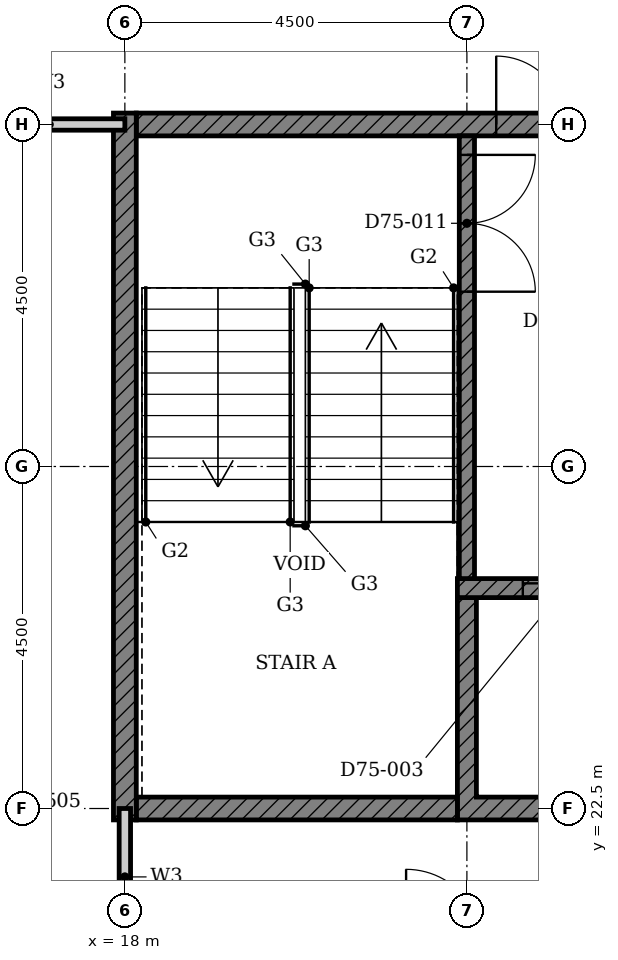
"""IFC4 building model, lengths in metres.
Left out: names, types, materials, properties, quantities, classifications, styles, units other than length and angle.
Written with IfcOpenShell. Run it as: python <this file> out.ifc"""

import sys

from ifc_helpers import new_model, si_unit, direction, frame, frame_2d, origin, place, context, subcontext, project, spatial, polyline, rectangle, outline, extrude, element, fill, save


model = new_model("IFC4")
c1 = context("Model", 3, precision=1e-05, world=origin(), true_north=direction((0.0, 1.0)))
c2 = subcontext(c1, "Body", "Model", "MODEL_VIEW")
j1 = project(units=[si_unit("LENGTHUNIT", "METRE"), si_unit("PLANEANGLEUNIT", "RADIAN")], contexts=[c1])
p1 = place(None, origin())
s1 = spatial("IfcSite", under=j1, at=p1, CompositionType="ELEMENT")
p2 = place(p1, origin())
s2 = spatial("IfcBuilding", under=s1, at=p2, CompositionType="ELEMENT")
p3 = place(p2, frame((0.0, 0.0, 294.5)))
s3 = spatial("IfcBuildingStorey", under=s2, at=p3, CompositionType="ELEMENT", Elevation=294.5)
p4 = place(p3, origin())
e1 = element("IfcWall", 1, at=p4, inside=s3, PredefinedType="SHEAR", context=c2, shape_type="SweptSolid", body=[
    extrude(outline(polyline([(22.375, 22.35), (25.197, 22.35), (25.197, 25.275), (24.947, 25.275), (24.947, 22.65), (22.625, 22.65), (22.625, 25.275), (22.375, 25.275), (22.375, 22.35)])), origin(), (0.0, 0.0, 1.0), 3.4),
])
p5 = place(p3, frame((18.15, 22.5, 0.0), z_axis=(0.0, 0.0, 1.0), x_axis=(1.0, 0.0, 0.0)))
e2 = element("IfcWall", 2, at=p5, inside=s3, PredefinedType="SHEAR", context=c2, shape_type="SweptSolid", body=[
    extrude(rectangle(XDim=4.225, YDim=0.3, at=frame_2d((2.113, 0.0))), origin(), (0.0, 0.0, 1.0), 3.4),
])
p6 = place(p3, frame((18.15, 31.5, 0.0), z_axis=(0.0, 0.0, 1.0), x_axis=(1.0, 0.0, 0.0)))
e3 = element("IfcWall", 3, at=p6, inside=s3, PredefinedType="SHEAR", context=c2, shape_type="SweptSolid", body=[
    extrude(rectangle(XDim=9.368, YDim=0.3, at=frame_2d((4.684, 0.0))), origin(), (0.0, 0.0, 1.0), 3.4),
])
p7 = place(p6, frame((4.736, 0.0, 0.0)))
e4 = element("IfcOpeningElement", 4, at=p7, cuts=e3, PredefinedType="OPENING", context=c2, shape_type="SweptSolid", body=[
    extrude(rectangle(XDim=1.8, YDim=2.1, at=frame_2d((0.9, 1.05))), frame((0.0, 0.16, 0.0), z_axis=(0.0, -1.0, 0.0), x_axis=(1.0, 0.0, 0.0)), (0.0, 0.0, 1.0), 0.32),
])
p8 = place(p3, frame((18.0, 22.35, 0.0), z_axis=(0.0, 0.0, 1.0), x_axis=(0.0, 1.0, 0.0)))
e5 = element("IfcWall", 5, at=p8, inside=s3, PredefinedType="SHEAR", context=c2, shape_type="SweptSolid", body=[
    extrude(rectangle(XDim=9.3, YDim=0.3, at=frame_2d((4.65, 0.0))), origin(), (0.0, 0.0, 1.0), 3.4),
])
p9 = place(p3, frame((22.375, 25.4, 0.0), z_axis=(0.0, 0.0, 1.0), x_axis=(1.0, 0.0, 0.0)))
e6 = element("IfcWall", 6, at=p9, inside=s3, PredefinedType="SHEAR", context=c2, shape_type="SweptSolid", body=[
    extrude(rectangle(XDim=15.678, YDim=0.25, at=frame_2d((7.839, 0.0))), origin(), (0.0, 0.0, 1.0), 3.4),
])
p10 = place(p9, frame((6.004, 0.0, 0.0)))
e7 = element("IfcOpeningElement", 7, at=p10, cuts=e6, PredefinedType="OPENING", context=c2, shape_type="SweptSolid", body=[
    extrude(rectangle(XDim=1.1, YDim=2.1, at=frame_2d((0.55, 1.05))), frame((0.0, 0.135, 0.0), z_axis=(0.0, -1.0, 0.0), x_axis=(1.0, 0.0, 0.0)), (0.0, 0.0, 1.0), 0.27),
])
p11 = place(p9, frame((0.861, 0.0, 0.0)))
e8 = element("IfcOpeningElement", 8, at=p11, cuts=e6, PredefinedType="OPENING", context=c2, shape_type="SweptSolid", body=[
    extrude(rectangle(XDim=1.1, YDim=2.1, at=frame_2d((0.55, 1.05))), frame((0.0, 0.135, 0.0), z_axis=(0.0, -1.0, 0.0), x_axis=(1.0, 0.0, 0.0)), (0.0, 0.0, 1.0), 0.27),
])
p12 = place(p9, frame((3.532, 0.0, 0.0)))
e9 = element("IfcOpeningElement", 9, at=p12, cuts=e6, PredefinedType="OPENING", context=c2, shape_type="SweptSolid", body=[
    extrude(rectangle(XDim=0.9, YDim=2.1, at=frame_2d((0.45, 1.05))), frame((0.0, 0.135, 0.0), z_axis=(0.0, -1.0, 0.0), x_axis=(1.0, 0.0, 0.0)), (0.0, 0.0, 1.0), 0.27),
])
p13 = place(p9, frame((8.675, 0.0, 0.0)))
e10 = element("IfcOpeningElement", 10, at=p13, cuts=e6, PredefinedType="OPENING", context=c2, shape_type="SweptSolid", body=[
    extrude(rectangle(XDim=0.9, YDim=2.1, at=frame_2d((0.45, 1.05))), frame((0.0, 0.135, 0.0), z_axis=(0.0, -1.0, 0.0), x_axis=(1.0, 0.0, 0.0)), (0.0, 0.0, 1.0), 0.27),
])
p14 = place(p9, frame((12.532, 0.0, 0.0)))
e11 = element("IfcOpeningElement", 11, at=p14, cuts=e6, PredefinedType="OPENING", context=c2, shape_type="SweptSolid", body=[
    extrude(rectangle(XDim=0.9, YDim=2.1, at=frame_2d((0.45, 1.05))), frame((0.0, 0.135, 0.0), z_axis=(0.0, -1.0, 0.0), x_axis=(1.0, 0.0, 0.0)), (0.0, 0.0, 1.0), 0.27),
])
p15 = place(p3, frame((22.5, 31.35, 0.0), z_axis=(0.0, 0.0, 1.0), x_axis=(0.0, -1.0, 0.0)))
e12 = element("IfcWall", 12, at=p15, inside=s3, PredefinedType="SHEAR", context=c2, shape_type="SweptSolid", body=[
    extrude(rectangle(XDim=5.825, YDim=0.2, at=frame_2d((2.913, 0.0))), origin(), (0.0, 0.0, 1.0), 3.4),
])
p16 = place(p15, frame((0.25, 0.0, 0.0)))
e13 = element("IfcOpeningElement", 13, at=p16, cuts=e12, PredefinedType="OPENING", context=c2, shape_type="SweptSolid", body=[
    extrude(rectangle(XDim=1.8, YDim=2.1, at=frame_2d((0.9, 1.05))), frame((0.0, 0.11, 0.0), z_axis=(0.0, -1.0, 0.0), x_axis=(1.0, 0.0, 0.0)), (0.0, 0.0, 1.0), 0.22),
])
p17 = place(p3, frame((13.26, 31.5, 0.0), z_axis=(0.0, 0.0, 1.0), x_axis=(1.0, 0.0, 0.0)))
e14 = element("IfcWall", 14, at=p17, inside=s3, PredefinedType="PARTITIONING", context=c2, shape_type="SweptSolid", body=[
    extrude(rectangle(XDim=4.74, YDim=0.15, at=frame_2d((2.37, 0.0))), origin(), (0.0, 0.0, 1.0), 3.4),
])
p18 = place(p17, frame((1.75, 0.0, 0.0)))
e15 = element("IfcOpeningElement", 15, at=p18, cuts=e14, PredefinedType="OPENING", context=c2, shape_type="SweptSolid", body=[
    extrude(rectangle(XDim=1.0, YDim=2.2, at=frame_2d((0.5, 1.1))), frame((0.0, 0.085, 0.0), z_axis=(0.0, -1.0, 0.0), x_axis=(1.0, 0.0, 0.0)), (0.0, 0.0, 1.0), 0.17),
])
p19 = place(p3, frame((18.0, 20.7, 0.0), z_axis=(0.0, 0.0, 1.0), x_axis=(0.0, 1.0, 0.0)))
e16 = element("IfcWall", 16, at=p19, inside=s3, PredefinedType="PARTITIONING", context=c2, shape_type="SweptSolid", body=[
    extrude(rectangle(XDim=1.8, YDim=0.15, at=frame_2d((0.9, 0.0))), origin(), (0.0, 0.0, 1.0), 3.4),
])
p20 = place(p11, origin())
e17 = element("IfcDoor", 17, at=p20, inside=s3, OperationType="DOUBLE_DOOR_SLIDING", PredefinedType="DOOR", context=c2, shape_type="SweptSolid", body=[
    extrude(rectangle(XDim=1.1, YDim=2.1, at=frame_2d((0.55, 1.05))), frame((0.0, 0.025, 0.0), z_axis=(0.0, -1.0, 0.0), x_axis=(1.0, 0.0, 0.0)), (0.0, 0.0, 1.0), 0.05),
])
fill(e8, e17)
p21 = place(p16, origin())
e18 = element("IfcDoor", 18, at=p21, inside=s3, OperationType="DOUBLE_DOOR_SINGLE_SWING", PredefinedType="DOOR", context=c2, shape_type="SweptSolid", body=[
    extrude(rectangle(XDim=1.8, YDim=2.1, at=frame_2d((0.9, 1.05))), frame((0.0, 0.025, 0.0), z_axis=(0.0, -1.0, 0.0), x_axis=(1.0, 0.0, 0.0)), (0.0, 0.0, 1.0), 0.05),
])
fill(e13, e18)
p22 = place(p7, origin())
e19 = element("IfcDoor", 19, at=p22, inside=s3, OperationType="DOUBLE_DOOR_SINGLE_SWING", PredefinedType="DOOR", context=c2, shape_type="SweptSolid", body=[
    extrude(rectangle(XDim=1.8, YDim=2.1, at=frame_2d((0.9, 1.05))), frame((0.0, 0.025, 0.0), z_axis=(0.0, -1.0, 0.0), x_axis=(1.0, 0.0, 0.0)), (0.0, 0.0, 1.0), 0.05),
])
fill(e4, e19)
save(model, sys.argv[1])
